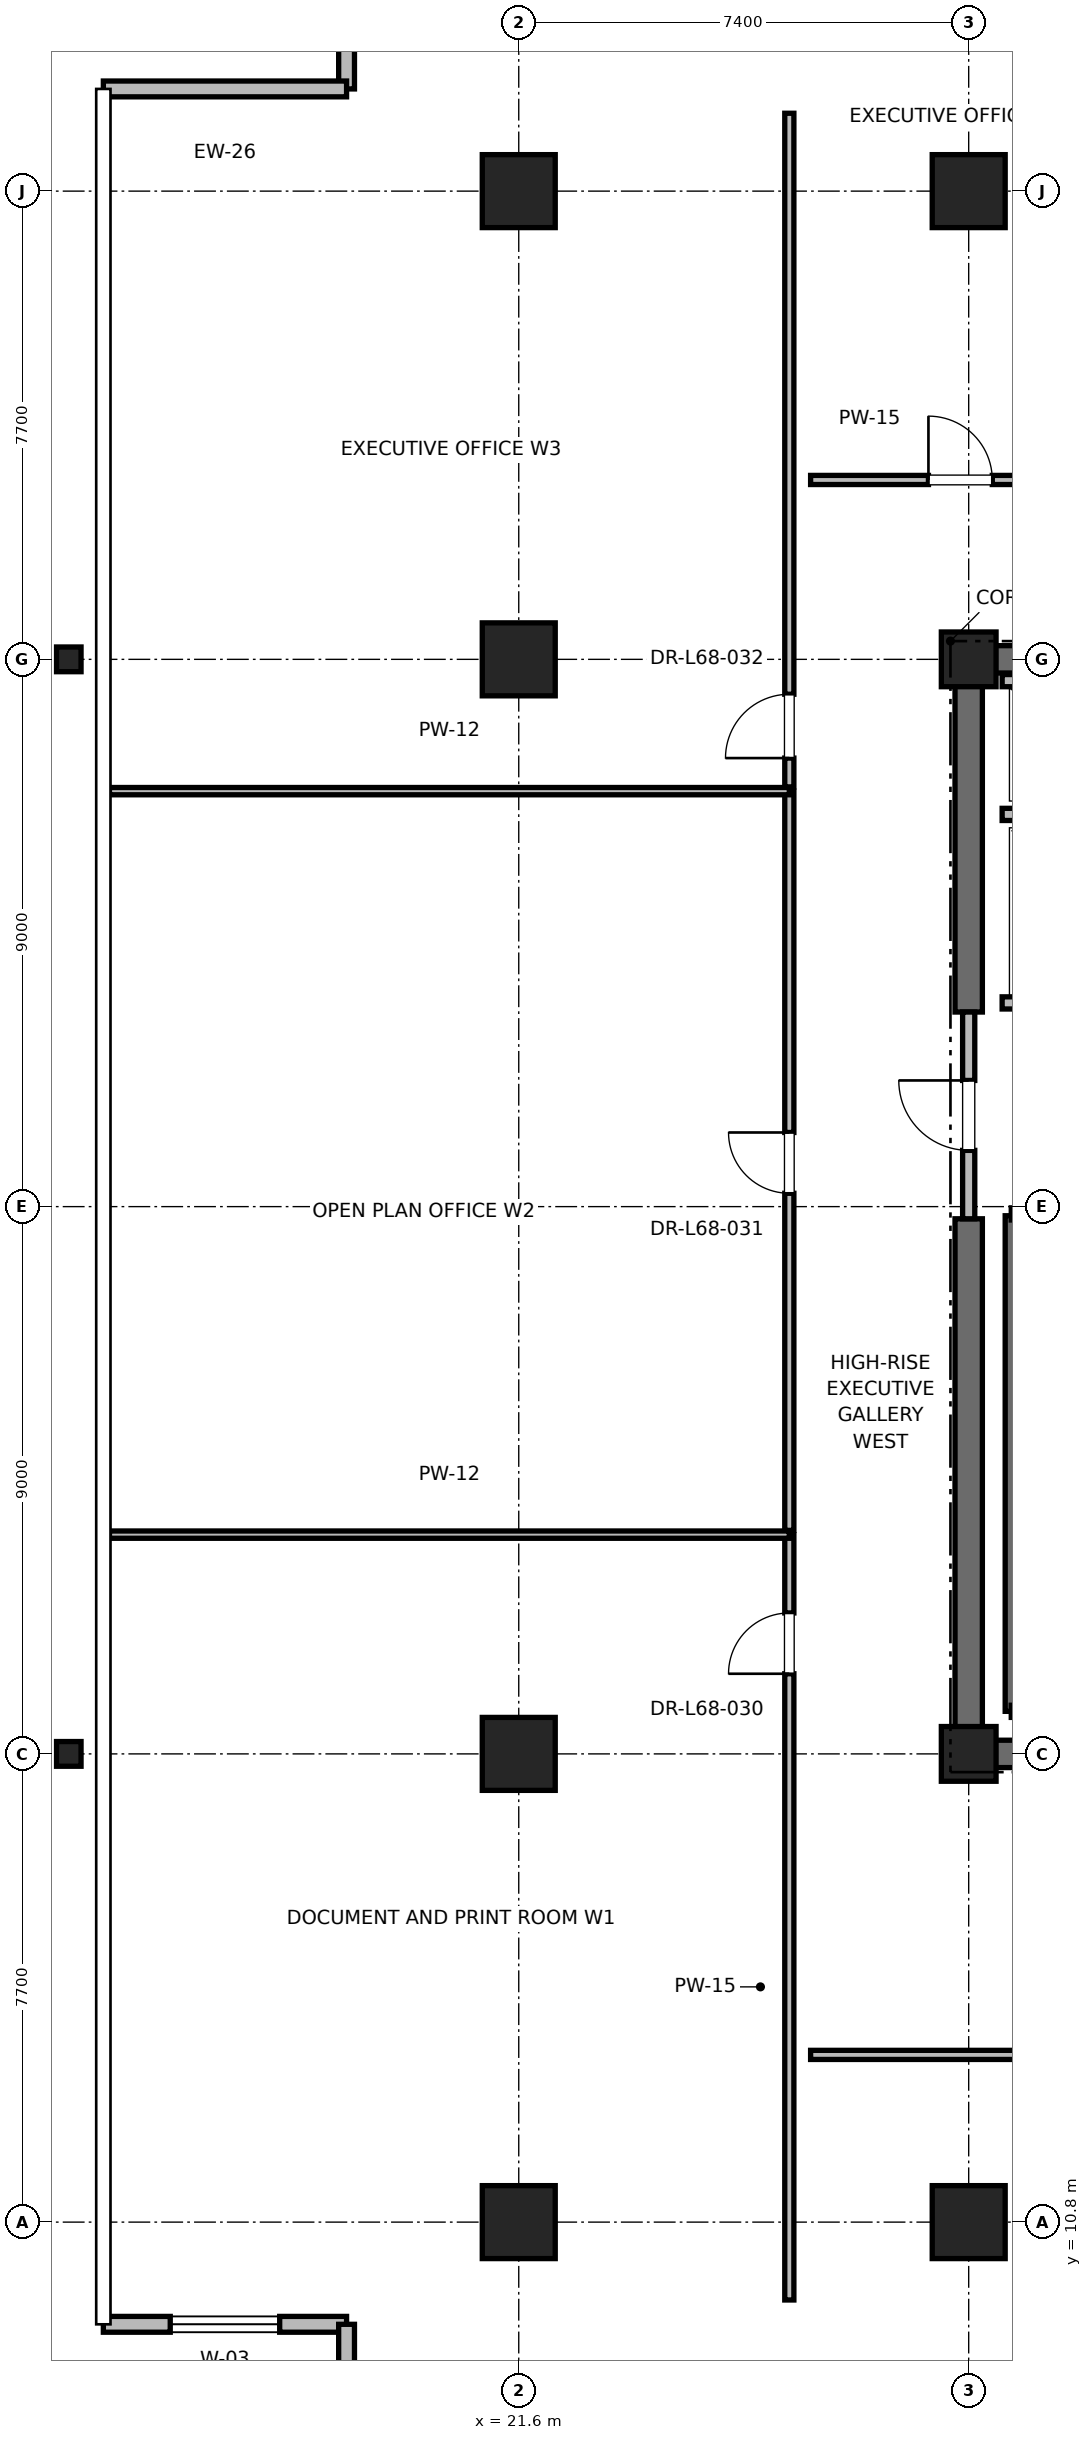
"""IFC4 building model, lengths in metres.
Left out: names, types, materials, properties, quantities, classifications, styles, units other than length and angle.
Written with IfcOpenShell. Run it as: python <this file> out.ifc"""

import sys

from ifc_helpers import new_model, si_unit, direction, frame, frame_2d, origin, origin_2d, place, context, subcontext, project, spatial, rectangle, i_section, extrude, element, fill, save


model = new_model("IFC4")
c1 = context("Model", 3, precision=1e-05, world=origin(), true_north=direction((0.0, 1.0)))
c2 = subcontext(c1, "Body", "Model", "MODEL_VIEW")
j1 = project(units=[si_unit("LENGTHUNIT", "METRE"), si_unit("PLANEANGLEUNIT", "RADIAN")], contexts=[c1])
p1 = place(None, origin())
s1 = spatial("IfcSite", under=j1, at=p1, CompositionType="ELEMENT")
p2 = place(p1, origin())
s2 = spatial("IfcBuilding", under=s1, at=p2, CompositionType="ELEMENT")
p3 = place(p2, frame((0.0, 0.0, 291.2)))
s3 = spatial("IfcBuildingStorey", under=s2, at=p3, CompositionType="ELEMENT", Elevation=291.2)
for number, where, z_axis, x_axis in (
    (1, (29.0, 10.8, 0.0), (0.0, 0.0, 1.0), (1.0, 0.0, 0.0)),
    (2, (29.0, 44.2, 0.0), (0.0, 0.0, 1.0), (1.0, 0.0, 0.0)),
    (3, (21.6, 18.5, 0.0), (0.0, 0.0, 1.0), (1.0, 0.0, 0.0)),
    (4, (21.6, 36.5, 0.0), (0.0, 0.0, 1.0), (1.0, 0.0, 0.0)),
    (5, (21.6, 10.8, 0.0), (0.0, 0.0, 1.0), (1.0, 0.0, 0.0)),
    (6, (21.6, 44.2, 0.0), (0.0, 0.0, 1.0), (1.0, 0.0, 0.0)),
):
    element("IfcColumn", number, at=place(p3, frame(where, z_axis=z_axis, x_axis=x_axis)), inside=s3, PredefinedType="COLUMN", context=c2, shape_type="SweptSolid", body=[
        extrude(rectangle(XDim=1.2, YDim=1.2, at=origin_2d()), origin(), (0.0, 0.0, 1.0), 4.0),
    ])
for number, where, z_axis, x_axis in (
    (7, (14.2, 18.5, 0.0), (0.0, 0.0, 1.0), (1.0, 0.0, 0.0)),
    (8, (14.2, 36.5, 0.0), (0.0, 0.0, 1.0), (1.0, 0.0, 0.0)),
):
    element("IfcColumn", number, at=place(p3, frame(where, z_axis=z_axis, x_axis=x_axis)), inside=s3, PredefinedType="COLUMN", context=c2, shape_type="SweptSolid", body=[
        extrude(i_section(OverallWidth=0.403, OverallDepth=0.406, WebThickness=0.027, FlangeThickness=0.043, FilletRadius=0.015, at=origin_2d()), origin(), (0.0, 0.0, 1.0), 4.0),
    ])
for number, where, z_axis, x_axis in (
    (9, (29.0, 18.5, 0.0), (0.0, 0.0, 1.0), (1.0, 0.0, 0.0)),
    (10, (29.0, 36.5, 0.0), (0.0, 0.0, 1.0), (1.0, 0.0, 0.0)),
):
    element("IfcColumn", number, at=place(p3, frame(where, z_axis=z_axis, x_axis=x_axis)), inside=s3, PredefinedType="PILASTER", context=c2, shape_type="SweptSolid", body=[
        extrude(rectangle(XDim=0.9, YDim=0.9, at=origin_2d()), origin(), (0.0, 0.0, 1.0), 4.0),
    ])
p4 = place(p3, frame((29.0, 18.5, 0.0), z_axis=(0.0, 0.0, 1.0), x_axis=(1.0, 0.0, 0.0)))
e11 = element("IfcWall", 11, at=p4, inside=s3, PredefinedType="SHEAR", context=c2, shape_type="SweptSolid", body=[
    extrude(rectangle(XDim=9.2, YDim=0.45, at=frame_2d((4.6, 0.0))), origin(), (0.0, 0.0, 1.0), 3.7),
])
p5 = place(p3, frame((29.0, 36.5, 0.0), z_axis=(0.0, 0.0, 1.0), x_axis=(1.0, 0.0, 0.0)))
e12 = element("IfcWall", 12, at=p5, inside=s3, PredefinedType="SHEAR", context=c2, shape_type="SweptSolid", body=[
    extrude(rectangle(XDim=5.8, YDim=0.45, at=frame_2d((2.9, 0.0))), origin(), (0.0, 0.0, 1.0), 3.7),
])
p6 = place(p3, frame((29.0, 18.5, 0.0), z_axis=(0.0, 0.0, 1.0), x_axis=(0.0, 1.0, 0.0)))
e13 = element("IfcWall", 13, at=p6, inside=s3, PredefinedType="SHEAR", context=c2, shape_type="SweptSolid", body=[
    extrude(rectangle(XDim=8.8, YDim=0.45, at=frame_2d((4.4, 0.0))), origin(), (0.0, 0.0, 1.0), 3.7),
])
p7 = place(p3, frame((29.0, 30.7, 0.0), z_axis=(0.0, 0.0, 1.0), x_axis=(0.0, 1.0, 0.0)))
e14 = element("IfcWall", 14, at=p7, inside=s3, PredefinedType="SHEAR", context=c2, shape_type="SweptSolid", body=[
    extrude(rectangle(XDim=5.8, YDim=0.45, at=frame_2d((2.9, 0.0))), origin(), (0.0, 0.0, 1.0), 3.7),
])
p8 = place(p3, frame((14.768, 9.119, 0.0), z_axis=(0.0, 0.0, 1.0), x_axis=(1.0, 0.0, 0.0)))
e15 = element("IfcWall", 15, at=p8, inside=s3, PredefinedType="PARAPET", context=c2, shape_type="SweptSolid", body=[
    extrude(rectangle(XDim=4.0, YDim=0.26, at=frame_2d((2.0, 0.0))), origin(), (0.0, 0.0, 1.0), 3.7),
])
p9 = place(p8, frame((1.1, 0.0, 0.85)))
e16 = element("IfcOpeningElement", 16, at=p9, cuts=e15, PredefinedType="OPENING", context=c2, shape_type="SweptSolid", body=[
    extrude(rectangle(XDim=1.8, YDim=2.2, at=frame_2d((0.9, 1.1))), frame((0.0, 0.13, 0.0), z_axis=(0.0, -1.0, 0.0), x_axis=(1.0, 0.0, 0.0)), (0.0, 0.0, 1.0), 0.26),
])
p10 = place(p3, frame((18.768, 9.119, 0.0), z_axis=(0.0, 0.0, 1.0), x_axis=(0.0, -1.0, 0.0)))
e17 = element("IfcWall", 17, at=p10, inside=s3, PredefinedType="PARAPET", context=c2, shape_type="SweptSolid", body=[
    extrude(rectangle(XDim=3.5, YDim=0.26, at=frame_2d((1.75, 0.0))), origin(), (0.0, 0.0, 1.0), 3.7),
])
p11 = place(p3, frame((18.768, 49.381, 0.0), z_axis=(0.0, 0.0, 1.0), x_axis=(0.0, -1.0, 0.0)))
e18 = element("IfcWall", 18, at=p11, inside=s3, PredefinedType="PARAPET", context=c2, shape_type="SweptSolid", body=[
    extrude(rectangle(XDim=3.5, YDim=0.26, at=frame_2d((1.75, 0.0))), origin(), (0.0, 0.0, 1.0), 3.7),
])
p12 = place(p11, frame((0.85, 0.0, 0.85)))
e19 = element("IfcOpeningElement", 19, at=p12, cuts=e18, PredefinedType="OPENING", context=c2, shape_type="SweptSolid", body=[
    extrude(rectangle(XDim=1.8, YDim=2.2, at=frame_2d((0.9, 1.1))), frame((0.0, 0.13, 0.0), z_axis=(0.0, -1.0, 0.0), x_axis=(1.0, 0.0, 0.0)), (0.0, 0.0, 1.0), 0.26),
])
p13 = place(p3, frame((18.768, 45.881, 0.0), z_axis=(0.0, 0.0, 1.0), x_axis=(-1.0, 0.0, 0.0)))
e20 = element("IfcWall", 20, at=p13, inside=s3, PredefinedType="PARAPET", context=c2, shape_type="SweptSolid", body=[
    extrude(rectangle(XDim=4.0, YDim=0.26, at=frame_2d((2.0, 0.0))), origin(), (0.0, 0.0, 1.0), 3.7),
])
p14 = place(p3, frame((29.7, 19.2, 0.0), z_axis=(0.0, 0.0, 1.0), x_axis=(0.0, 1.0, 0.0)))
e21 = element("IfcWall", 21, at=p14, inside=s3, PredefinedType="SOLIDWALL", context=c2, shape_type="SweptSolid", body=[
    extrude(rectangle(XDim=8.15, YDim=0.2, at=frame_2d((4.075, 0.0))), origin(), (0.0, 0.0, 1.0), 3.7),
])
p15 = place(p3, frame((29.0, 27.3, 0.0), z_axis=(0.0, 0.0, 1.0), x_axis=(0.0, 1.0, 0.0)))
e22 = element("IfcWall", 22, at=p15, inside=s3, PredefinedType="PARTITIONING", context=c2, shape_type="SweptSolid", body=[
    extrude(rectangle(XDim=3.4, YDim=0.2, at=frame_2d((1.7, 0.0))), origin(), (0.0, 0.0, 1.0), 2.78),
])
p16 = place(p15, frame((1.125, 0.0, 0.0)))
e23 = element("IfcOpeningElement", 23, at=p16, cuts=e22, PredefinedType="OPENING", context=c2, shape_type="SweptSolid", body=[
    extrude(rectangle(XDim=1.15, YDim=2.2, at=frame_2d((0.575, 1.1))), frame((0.0, 0.1, 0.0), z_axis=(0.0, -1.0, 0.0), x_axis=(1.0, 0.0, 0.0)), (0.0, 0.0, 1.0), 0.2),
])
p17 = place(p3, frame((29.55, 30.85, 0.0), z_axis=(0.0, 0.0, 1.0), x_axis=(1.0, 0.0, 0.0)))
e24 = element("IfcWall", 24, at=p17, inside=s3, PredefinedType="SOLIDWALL", context=c2, shape_type="SweptSolid", body=[
    extrude(rectangle(XDim=2.6, YDim=0.2, at=frame_2d((1.3, 0.0))), origin(), (0.0, 0.0, 1.0), 2.78),
])
p18 = place(p17, frame((0.75, 0.0, 0.0)))
e25 = element("IfcOpeningElement", 25, at=p18, cuts=e24, PredefinedType="OPENING", context=c2, shape_type="SweptSolid", body=[
    extrude(rectangle(XDim=1.1, YDim=2.2, at=frame_2d((0.55, 1.1))), frame((0.0, 0.1, 0.0), z_axis=(0.0, -1.0, 0.0), x_axis=(1.0, 0.0, 0.0)), (0.0, 0.0, 1.0), 0.2),
])
p19 = place(p3, frame((29.55, 33.95, 0.0), z_axis=(0.0, 0.0, 1.0), x_axis=(1.0, 0.0, 0.0)))
e26 = element("IfcWall", 26, at=p19, inside=s3, PredefinedType="SOLIDWALL", context=c2, shape_type="SweptSolid", body=[
    extrude(rectangle(XDim=2.8, YDim=0.2, at=frame_2d((1.4, 0.0))), origin(), (0.0, 0.0, 1.0), 3.7),
])
p20 = place(p3, frame((32.35, 36.15, 0.0), z_axis=(0.0, 0.0, 1.0), x_axis=(-1.0, 0.0, 0.0)))
e27 = element("IfcWall", 27, at=p20, inside=s3, PredefinedType="SOLIDWALL", context=c2, shape_type="SweptSolid", body=[
    extrude(rectangle(XDim=2.8, YDim=0.2, at=frame_2d((1.4, 0.0))), origin(), (0.0, 0.0, 1.0), 2.753),
])
p21 = place(p3, frame((26.4, 39.45, 0.0), z_axis=(0.0, 0.0, 1.0), x_axis=(1.0, 0.0, 0.0)))
e28 = element("IfcWall", 28, at=p21, inside=s3, PredefinedType="PARTITIONING", context=c2, shape_type="SweptSolid", body=[
    extrude(rectangle(XDim=4.896, YDim=0.15, at=frame_2d((2.448, 0.0))), origin(), (0.0, 0.0, 1.0), 2.753),
])
p22 = place(p21, frame((1.938, 0.0, 0.0)))
e29 = element("IfcOpeningElement", 29, at=p22, cuts=e28, PredefinedType="OPENING", context=c2, shape_type="SweptSolid", body=[
    extrude(rectangle(XDim=1.05, YDim=2.2, at=frame_2d((0.525, 1.1))), frame((0.0, 0.075, 0.0), z_axis=(0.0, -1.0, 0.0), x_axis=(1.0, 0.0, 0.0)), (0.0, 0.0, 1.0), 0.15),
])
p23 = place(p3, frame((26.4, 13.55, 0.0), z_axis=(0.0, 0.0, 1.0), x_axis=(1.0, 0.0, 0.0)))
e30 = element("IfcWall", 30, at=p23, inside=s3, PredefinedType="PARTITIONING", context=c2, shape_type="SweptSolid", body=[
    extrude(rectangle(XDim=27.2, YDim=0.15, at=frame_2d((13.6, 0.0))), origin(), (0.0, 0.0, 1.0), 2.753),
])
p24 = place(p23, frame((13.1, 0.0, 0.0)))
e31 = element("IfcOpeningElement", 31, at=p24, cuts=e30, PredefinedType="OPENING", context=c2, shape_type="SweptSolid", body=[
    extrude(rectangle(XDim=1.0, YDim=2.15, at=frame_2d((0.5, 1.075))), frame((0.0, 0.075, 0.0), z_axis=(0.0, -1.0, 0.0), x_axis=(1.0, 0.0, 0.0)), (0.0, 0.0, 1.0), 0.15),
])
p25 = place(p3, frame((26.05, 9.519, 0.0), z_axis=(0.0, 0.0, 1.0), x_axis=(0.0, 1.0, 0.0)))
e32 = element("IfcWall", 32, at=p25, inside=s3, PredefinedType="PARTITIONING", context=c2, shape_type="SweptSolid", body=[
    extrude(rectangle(XDim=12.586, YDim=0.15, at=frame_2d((6.293, 0.0))), origin(), (0.0, 0.0, 1.0), 2.753),
])
p26 = place(p25, frame((10.299, 0.0, 0.0)))
e33 = element("IfcOpeningElement", 33, at=p26, cuts=e32, PredefinedType="OPENING", context=c2, shape_type="SweptSolid", body=[
    extrude(rectangle(XDim=1.0, YDim=2.15, at=frame_2d((0.5, 1.075))), frame((0.0, 0.075, 0.0), z_axis=(0.0, -1.0, 0.0), x_axis=(1.0, 0.0, 0.0)), (0.0, 0.0, 1.0), 0.15),
])
p27 = place(p3, frame((14.868, 22.106, 0.0), z_axis=(0.0, 0.0, 1.0), x_axis=(1.0, 0.0, 0.0)))
e34 = element("IfcWall", 34, at=p27, inside=s3, PredefinedType="PARTITIONING", context=c2, shape_type="SweptSolid", body=[
    extrude(rectangle(XDim=11.182, YDim=0.12, at=frame_2d((5.591, 0.0))), origin(), (0.0, 0.0, 1.0), 2.753),
])
p28 = place(p3, frame((26.05, 22.176, 0.0), z_axis=(0.0, 0.0, 1.0), x_axis=(0.0, 1.0, 0.0)))
e35 = element("IfcWall", 35, at=p28, inside=s3, PredefinedType="PARTITIONING", context=c2, shape_type="SweptSolid", body=[
    extrude(rectangle(XDim=12.157, YDim=0.15, at=frame_2d((6.078, 0.0))), origin(), (0.0, 0.0, 1.0), 2.85),
])
p29 = place(p28, frame((5.543, 0.0, 0.0)))
e36 = element("IfcOpeningElement", 36, at=p29, cuts=e35, PredefinedType="OPENING", context=c2, shape_type="SweptSolid", body=[
    extrude(rectangle(XDim=1.0, YDim=2.15, at=frame_2d((0.5, 1.075))), frame((0.0, 0.075, 0.0), z_axis=(0.0, -1.0, 0.0), x_axis=(1.0, 0.0, 0.0)), (0.0, 0.0, 1.0), 0.15),
])
p30 = place(p3, frame((14.868, 34.333, 0.0), z_axis=(0.0, 0.0, 1.0), x_axis=(1.0, 0.0, 0.0)))
e37 = element("IfcWall", 37, at=p30, inside=s3, PredefinedType="PARTITIONING", context=c2, shape_type="SweptSolid", body=[
    extrude(rectangle(XDim=11.182, YDim=0.12, at=frame_2d((5.591, 0.0))), origin(), (0.0, 0.0, 1.0), 2.753),
])
p31 = place(p3, frame((26.05, 34.403, 0.0), z_axis=(0.0, 0.0, 1.0), x_axis=(0.0, 1.0, 0.0)))
e38 = element("IfcWall", 38, at=p31, inside=s3, PredefinedType="PARTITIONING", context=c2, shape_type="SweptSolid", body=[
    extrude(rectangle(XDim=11.078, YDim=0.15, at=frame_2d((5.539, 0.0))), origin(), (0.0, 0.0, 1.0), 2.753),
])
p32 = place(p31, frame((0.474, 0.0, 0.0)))
e39 = element("IfcOpeningElement", 39, at=p32, cuts=e38, PredefinedType="OPENING", context=c2, shape_type="SweptSolid", body=[
    extrude(rectangle(XDim=1.05, YDim=2.2, at=frame_2d((0.525, 1.1))), frame((0.0, 0.075, 0.0), z_axis=(0.0, -1.0, 0.0), x_axis=(1.0, 0.0, 0.0)), (0.0, 0.0, 1.0), 0.15),
])
p33 = place(p9, origin())
e40 = element("IfcWindow", 40, at=p33, inside=s3, PartitioningType="SINGLE_PANEL", PredefinedType="WINDOW", context=c2, shape_type="SweptSolid", body=[
    extrude(rectangle(XDim=1.8, YDim=2.2, at=frame_2d((0.9, 1.1))), frame((0.0, 0.03, 0.0), z_axis=(0.0, -1.0, 0.0), x_axis=(1.0, 0.0, 0.0)), (0.0, 0.0, 1.0), 0.06),
])
fill(e16, e40)
p34 = place(p16, origin())
e41 = element("IfcDoor", 41, at=p34, inside=s3, OperationType="SINGLE_SWING_RIGHT", PredefinedType="DOOR", context=c2, shape_type="SweptSolid", body=[
    extrude(rectangle(XDim=1.15, YDim=2.2, at=frame_2d((0.575, 1.1))), frame((0.0, 0.025, 0.0), z_axis=(0.0, -1.0, 0.0), x_axis=(1.0, 0.0, 0.0)), (0.0, 0.0, 1.0), 0.05),
])
fill(e23, e41)
p35 = place(p22, origin())
e42 = element("IfcDoor", 42, at=p35, inside=s3, OperationType="SINGLE_SWING_LEFT", PredefinedType="DOOR", context=c2, shape_type="SweptSolid", body=[
    extrude(rectangle(XDim=1.05, YDim=2.2, at=frame_2d((0.525, 1.1))), frame((0.0, 0.025, 0.0), z_axis=(0.0, -1.0, 0.0), x_axis=(1.0, 0.0, 0.0)), (0.0, 0.0, 1.0), 0.05),
])
fill(e29, e42)
p36 = place(p26, origin())
e43 = element("IfcDoor", 43, at=p36, inside=s3, OperationType="SINGLE_SWING_LEFT", PredefinedType="DOOR", context=c2, shape_type="SweptSolid", body=[
    extrude(rectangle(XDim=1.0, YDim=2.15, at=frame_2d((0.5, 1.075))), frame((0.0, 0.025, 0.0), z_axis=(0.0, -1.0, 0.0), x_axis=(1.0, 0.0, 0.0)), (0.0, 0.0, 1.0), 0.05),
])
fill(e33, e43)
p37 = place(p29, origin())
e44 = element("IfcDoor", 44, at=p37, inside=s3, OperationType="SINGLE_SWING_RIGHT", PredefinedType="DOOR", context=c2, shape_type="SweptSolid", body=[
    extrude(rectangle(XDim=1.0, YDim=2.15, at=frame_2d((0.5, 1.075))), frame((0.0, 0.025, 0.0), z_axis=(0.0, -1.0, 0.0), x_axis=(1.0, 0.0, 0.0)), (0.0, 0.0, 1.0), 0.05),
])
fill(e36, e44)
p38 = place(p32, origin())
e45 = element("IfcDoor", 45, at=p38, inside=s3, OperationType="SINGLE_SWING_LEFT", PredefinedType="DOOR", context=c2, shape_type="SweptSolid", body=[
    extrude(rectangle(XDim=1.05, YDim=2.2, at=frame_2d((0.525, 1.1))), frame((0.0, 0.025, 0.0), z_axis=(0.0, -1.0, 0.0), x_axis=(1.0, 0.0, 0.0)), (0.0, 0.0, 1.0), 0.05),
])
fill(e39, e45)
save(model, sys.argv[1])
